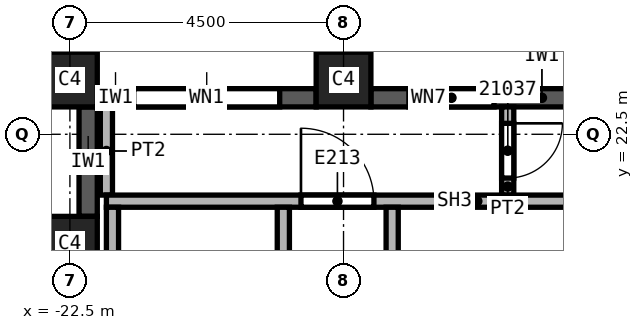
"""IFC4 building model, lengths in metres.
Left out: names, types, materials, properties, quantities, classifications, styles, units other than length and angle.
Written with IfcOpenShell. Run it as: python <this file> out.ifc"""

import sys

from ifc_helpers import new_model, si_unit, direction, frame, frame_2d, origin, origin_2d, place, context, subcontext, project, spatial, rectangle, extrude, element, fill, save


model = new_model("IFC4")
c1 = context("Model", 3, precision=1e-05, world=origin(), true_north=direction((0.0, 1.0)))
c2 = subcontext(c1, "Body", "Model", "MODEL_VIEW")
j1 = project(units=[si_unit("LENGTHUNIT", "METRE"), si_unit("PLANEANGLEUNIT", "RADIAN")], contexts=[c1])
p1 = place(None, origin())
s1 = spatial("IfcSite", under=j1, at=p1, CompositionType="ELEMENT")
p2 = place(p1, origin())
s2 = spatial("IfcBuilding", under=s1, at=p2, CompositionType="ELEMENT")
p3 = place(p2, frame((0.0, 0.0, 304.0)))
s3 = spatial("IfcBuildingStorey", under=s2, at=p3, CompositionType="ELEMENT", Elevation=304.0)
for number, where, z_axis, x_axis in (
    (1, (-18.0, 23.4, 0.0), (0.0, 0.0, 1.0), (1.0, 0.0, 0.0)),
    (2, (-22.5, 23.4, 0.0), (0.0, 0.0, 1.0), (1.0, 0.0, 0.0)),
    (3, (-22.5, 20.7, 0.0), (0.0, 0.0, 1.0), (1.0, 0.0, 0.0)),
):
    element("IfcColumn", number, at=place(p3, frame(where, z_axis=z_axis, x_axis=x_axis)), inside=s3, PredefinedType="COLUMN", context=c2, shape_type="SweptSolid", body=[
        extrude(rectangle(XDim=0.9, YDim=0.9, at=origin_2d()), origin(), (0.0, 0.0, 1.0), 3.74),
    ])
p4 = place(p3, frame((-13.95, 23.1, 0.0), z_axis=(0.0, 0.0, 1.0), x_axis=(-1.0, 0.0, 0.0)))
e4 = element("IfcWall", 4, at=p4, inside=s3, PredefinedType="SOLIDWALL", context=c2, shape_type="SweptSolid", body=[
    extrude(rectangle(XDim=3.6, YDim=0.3, at=frame_2d((1.8, 0.0))), origin(), (0.0, 0.0, 1.0), 3.14),
])
p5 = place(p4, frame((1.575, 0.0, 0.8)))
e5 = element("IfcOpeningElement", 5, at=p5, cuts=e4, PredefinedType="OPENING", context=c2, shape_type="SweptSolid", body=[
    extrude(rectangle(XDim=1.4, YDim=1.95, at=frame_2d((0.7, 0.975))), frame((0.0, 0.15, 0.0), z_axis=(0.0, -1.0, 0.0), x_axis=(1.0, 0.0, 0.0)), (0.0, 0.0, 1.0), 0.3),
])
p6 = place(p3, frame((-18.45, 23.1, 0.0), z_axis=(0.0, 0.0, 1.0), x_axis=(-1.0, 0.0, 0.0)))
e6 = element("IfcWall", 6, at=p6, inside=s3, PredefinedType="SOLIDWALL", context=c2, shape_type="SweptSolid", body=[
    extrude(rectangle(XDim=3.6, YDim=0.3, at=frame_2d((1.8, 0.0))), origin(), (0.0, 0.0, 1.0), 3.14),
])
p7 = place(p6, frame((0.6, 0.0, 0.8)))
e7 = element("IfcOpeningElement", 7, at=p7, cuts=e6, PredefinedType="OPENING", context=c2, shape_type="SweptSolid", body=[
    extrude(rectangle(XDim=2.4, YDim=1.95, at=frame_2d((1.2, 0.975))), frame((0.0, 0.15, 0.0), z_axis=(0.0, -1.0, 0.0), x_axis=(1.0, 0.0, 0.0)), (0.0, 0.0, 1.0), 0.3),
])
p8 = place(p3, frame((-22.2, 22.95, 0.0), z_axis=(0.0, 0.0, 1.0), x_axis=(0.0, -1.0, 0.0)))
e8 = element("IfcWall", 8, at=p8, inside=s3, PredefinedType="SOLIDWALL", context=c2, shape_type="SweptSolid", body=[
    extrude(rectangle(XDim=1.8, YDim=0.3, at=frame_2d((0.9, 0.0))), origin(), (0.0, 0.0, 1.0), 3.14),
])
p9 = place(p3, frame((-21.9, 21.5, 0.0), z_axis=(0.0, 0.0, 1.0), x_axis=(0.0, 1.0, 0.0)))
e9 = element("IfcWall", 9, at=p9, inside=s3, PredefinedType="PARTITIONING", context=c2, shape_type="SweptSolid", body=[
    extrude(rectangle(XDim=1.45, YDim=0.2, at=frame_2d((0.725, 0.0))), origin(), (0.0, 0.0, 1.0), 3.74),
])
p10 = place(p3, frame((-15.3, 22.95, 0.0), z_axis=(0.0, 0.0, 1.0), x_axis=(0.0, -1.0, 0.0)))
e10 = element("IfcWall", 10, at=p10, inside=s3, PredefinedType="PARTITIONING", context=c2, shape_type="SweptSolid", body=[
    extrude(rectangle(XDim=1.45, YDim=0.2, at=frame_2d((0.725, 0.0))), origin(), (0.0, 0.0, 1.0), 3.74),
])
p11 = place(p10, frame((0.27, 0.0, 0.0)))
e11 = element("IfcOpeningElement", 11, at=p11, cuts=e10, PredefinedType="OPENING", context=c2, shape_type="SweptSolid", body=[
    extrude(rectangle(XDim=0.9, YDim=2.1, at=frame_2d((0.45, 1.05))), frame((0.0, 0.1, 0.0), z_axis=(0.0, -1.0, 0.0), x_axis=(1.0, 0.0, 0.0)), (0.0, 0.0, 1.0), 0.2),
])
p12 = place(p3, frame((-21.9, 21.4, 0.0), z_axis=(0.0, 0.0, 1.0), x_axis=(1.0, 0.0, 0.0)))
e12 = element("IfcWall", 12, at=p12, inside=s3, PredefinedType="SOLIDWALL", context=c2, shape_type="SweptSolid", body=[
    extrude(rectangle(XDim=7.8, YDim=0.2, at=frame_2d((3.9, 0.0))), origin(), (0.0, 0.0, 1.0), 3.74),
])
p13 = place(p12, frame((3.2, 0.0, 0.0)))
e13 = element("IfcOpeningElement", 13, at=p13, cuts=e12, PredefinedType="OPENING", context=c2, shape_type="SweptSolid", body=[
    extrude(rectangle(XDim=1.2, YDim=2.1, at=frame_2d((0.6, 1.05))), frame((0.0, 0.1, 0.0), z_axis=(0.0, -1.0, 0.0), x_axis=(1.0, 0.0, 0.0)), (0.0, 0.0, 1.0), 0.2),
])
p14 = place(p3, frame((-21.8, 15.4, 0.0), z_axis=(0.0, 0.0, 1.0), x_axis=(0.0, 1.0, 0.0)))
e14 = element("IfcWall", 14, at=p14, inside=s3, PredefinedType="SOLIDWALL", context=c2, shape_type="SweptSolid", body=[
    extrude(rectangle(XDim=5.9, YDim=0.2, at=frame_2d((2.95, 0.0))), origin(), (0.0, 0.0, 1.0), 3.74),
])
p15 = place(p3, frame((-18.99, 15.4, 0.0), z_axis=(0.0, 0.0, 1.0), x_axis=(0.0, 1.0, 0.0)))
e15 = element("IfcWall", 15, at=p15, inside=s3, PredefinedType="SOLIDWALL", context=c2, shape_type="SweptSolid", body=[
    extrude(rectangle(XDim=5.9, YDim=0.2, at=frame_2d((2.95, 0.0))), origin(), (0.0, 0.0, 1.0), 3.74),
])
p16 = place(p15, frame((0.15, 0.0, 0.0)))
e16 = element("IfcOpeningElement", 16, at=p16, cuts=e15, PredefinedType="OPENING", context=c2, shape_type="SweptSolid", body=[
    extrude(rectangle(XDim=1.2, YDim=2.1, at=frame_2d((0.6, 1.05))), frame((0.0, 0.1, 0.0), z_axis=(0.0, -1.0, 0.0), x_axis=(1.0, 0.0, 0.0)), (0.0, 0.0, 1.0), 0.2),
])
p17 = place(p3, frame((-17.2, 18.5, 0.0), z_axis=(0.0, 0.0, 1.0), x_axis=(0.0, 1.0, 0.0)))
e17 = element("IfcWall", 17, at=p17, inside=s3, PredefinedType="SOLIDWALL", context=c2, shape_type="SweptSolid", body=[
    extrude(rectangle(XDim=2.8, YDim=0.2, at=frame_2d((1.4, 0.0))), origin(), (0.0, 0.0, 1.0), 3.74),
])
p18 = place(p7, origin())
e18 = element("IfcWindow", 18, at=p18, inside=s3, PartitioningType="SINGLE_PANEL", PredefinedType="WINDOW", context=c2, shape_type="SweptSolid", body=[
    extrude(rectangle(XDim=2.4, YDim=1.95, at=frame_2d((1.2, 0.975))), frame((0.0, 0.03, 0.0), z_axis=(0.0, -1.0, 0.0), x_axis=(1.0, 0.0, 0.0)), (0.0, 0.0, 1.0), 0.06),
])
fill(e7, e18)
p19 = place(p11, origin())
e19 = element("IfcDoor", 19, at=p19, inside=s3, OperationType="SINGLE_SWING_LEFT", PredefinedType="DOOR", context=c2, shape_type="SweptSolid", body=[
    extrude(rectangle(XDim=0.9, YDim=2.1, at=frame_2d((0.45, 1.05))), frame((0.0, 0.025, 0.0), z_axis=(0.0, -1.0, 0.0), x_axis=(1.0, 0.0, 0.0)), (0.0, 0.0, 1.0), 0.05),
])
fill(e11, e19)
p20 = place(p13, origin())
e20 = element("IfcDoor", 20, at=p20, inside=s3, OperationType="SINGLE_SWING_LEFT", PredefinedType="DOOR", context=c2, shape_type="SweptSolid", body=[
    extrude(rectangle(XDim=1.2, YDim=2.1, at=frame_2d((0.6, 1.05))), frame((0.0, 0.025, 0.0), z_axis=(0.0, -1.0, 0.0), x_axis=(1.0, 0.0, 0.0)), (0.0, 0.0, 1.0), 0.05),
])
fill(e13, e20)
p21 = place(p5, origin())
e21 = element("IfcWindow", 21, at=p21, inside=s3, PartitioningType="SINGLE_PANEL", PredefinedType="WINDOW", context=c2, shape_type="SweptSolid", body=[
    extrude(rectangle(XDim=1.4, YDim=1.95, at=frame_2d((0.7, 0.975))), frame((0.0, 0.03, 0.0), z_axis=(0.0, -1.0, 0.0), x_axis=(1.0, 0.0, 0.0)), (0.0, 0.0, 1.0), 0.06),
])
fill(e5, e21)
save(model, sys.argv[1])
